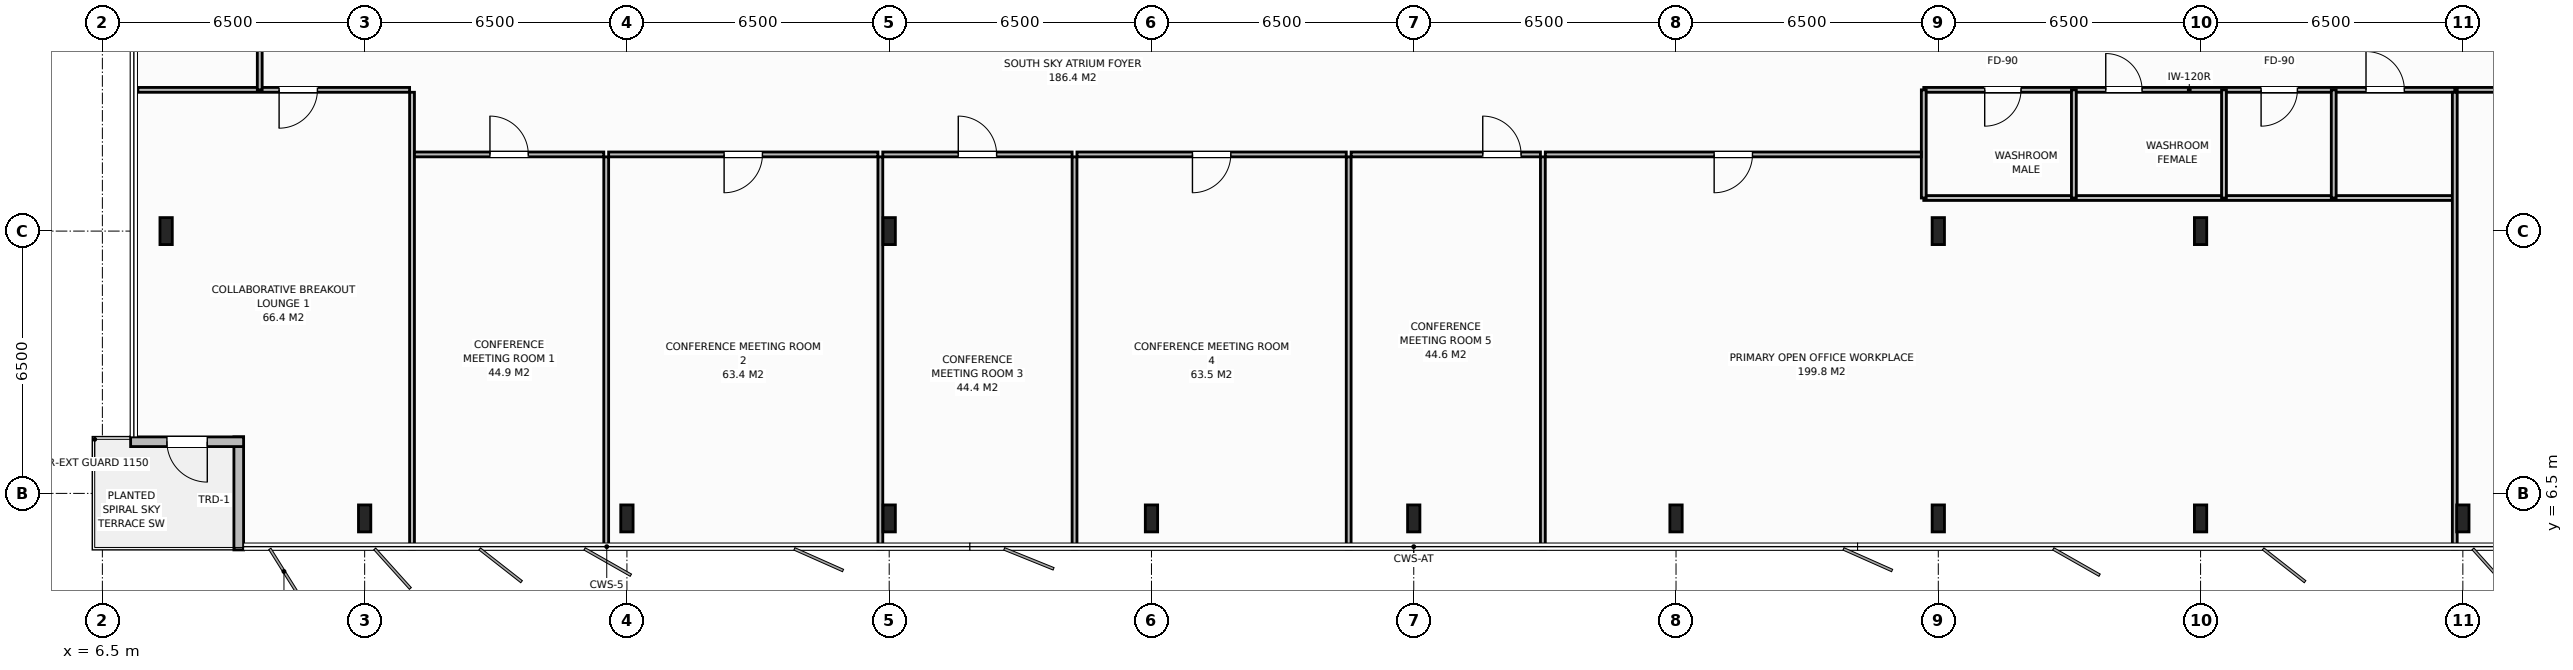
"""IFC4 building model, lengths in metres.
Left out: names, types, materials, properties, quantities, classifications, styles, units other than length and angle.
Written with IfcOpenShell. Run it as: python <this file> out.ifc"""

import sys

from ifc_helpers import new_model, si_unit, direction, frame, frame_2d, origin, origin_2d, place, context, subcontext, project, spatial, rectangle, i_section, extrude, element, fill, save


model = new_model("IFC4")
c1 = context("Model", 3, precision=1e-05, world=origin(), true_north=direction((0.0, 1.0)))
c2 = subcontext(c1, "Body", "Model", "MODEL_VIEW")
j1 = project(units=[si_unit("LENGTHUNIT", "METRE"), si_unit("PLANEANGLEUNIT", "RADIAN")], contexts=[c1])
p1 = place(None, origin())
s1 = spatial("IfcSite", under=j1, at=p1, CompositionType="ELEMENT")
p2 = place(p1, origin())
s2 = spatial("IfcBuilding", under=s1, at=p2, CompositionType="ELEMENT")
p3 = place(p2, frame((0.0, 0.0, 298.4)))
s3 = spatial("IfcBuildingStorey", under=s2, at=p3, CompositionType="ELEMENT", Elevation=298.4)
for number, where, z_axis, x_axis in (
    (1, (58.5, 13.0, 0.0), (0.0, 0.0, 1.0), (1.0, 0.0, 0.0)),
    (2, (26.0, 13.0, 0.0), (0.0, 0.0, 1.0), (1.0, 0.0, 0.0)),
    (3, (52.0, 13.0, 0.0), (0.0, 0.0, 1.0), (1.0, 0.0, 0.0)),
    (4, (13.0, 5.88, 0.0), (0.0, 0.0, 1.0), (1.0, 0.0, 0.0)),
    (5, (19.5, 5.88, 0.0), (0.0, 0.0, 1.0), (1.0, 0.0, 0.0)),
    (6, (26.0, 5.88, 0.0), (0.0, 0.0, 1.0), (1.0, 0.0, 0.0)),
    (7, (32.5, 5.88, 0.0), (0.0, 0.0, 1.0), (1.0, 0.0, 0.0)),
    (8, (39.0, 5.88, 0.0), (0.0, 0.0, 1.0), (1.0, 0.0, 0.0)),
    (9, (45.5, 5.88, 0.0), (0.0, 0.0, 1.0), (1.0, 0.0, 0.0)),
    (10, (52.0, 5.88, 0.0), (0.0, 0.0, 1.0), (1.0, 0.0, 0.0)),
    (11, (58.5, 5.88, 0.0), (0.0, 0.0, 1.0), (1.0, 0.0, 0.0)),
    (12, (65.0, 5.88, 0.0), (0.0, 0.0, 1.0), (1.0, 0.0, 0.0)),
    (13, (8.08, 13.0, 0.0), (0.0, 0.0, 1.0), (1.0, 0.0, 0.0)),
):
    element("IfcColumn", number, at=place(p3, frame(where, z_axis=z_axis, x_axis=x_axis)), inside=s3, PredefinedType="COLUMN", context=c2, shape_type="SweptSolid", body=[
        extrude(i_section(OverallWidth=0.305, OverallDepth=0.668, WebThickness=0.021, FlangeThickness=0.04, at=origin_2d()), origin(), (0.0, 0.0, 1.0), 4.0),
    ])
p4 = place(p3, frame((9.88, 5.1, 0.0), z_axis=(0.0, 0.0, 1.0), x_axis=(0.0, 1.0, 0.0)))
e14 = element("IfcWall", 14, at=p4, inside=s3, PredefinedType="STANDARD", context=c2, shape_type="SweptSolid", body=[
    extrude(rectangle(XDim=2.8, YDim=0.24, at=frame_2d((1.4, 0.0))), origin(), (0.0, 0.0, 1.0), 3.788),
])
p5 = place(p3, frame((10.0, 7.78, 0.0), z_axis=(0.0, 0.0, 1.0), x_axis=(-1.0, 0.0, 0.0)))
e15 = element("IfcWall", 15, at=p5, inside=s3, PredefinedType="STANDARD", context=c2, shape_type="SweptSolid", body=[
    extrude(rectangle(XDim=2.8, YDim=0.24, at=frame_2d((1.4, 0.0))), origin(), (0.0, 0.0, 1.0), 3.788),
])
p6 = place(p5, frame((0.9, 0.0, 0.0)))
e16 = element("IfcOpeningElement", 16, at=p6, cuts=e15, PredefinedType="OPENING", context=c2, shape_type="SweptSolid", body=[
    extrude(rectangle(XDim=1.0, YDim=2.2, at=frame_2d((0.5, 1.1))), frame((0.0, 0.13, 0.0), z_axis=(0.0, -1.0, 0.0), x_axis=(1.0, 0.0, 0.0)), (0.0, 0.0, 1.0), 0.26),
])
p7 = place(p3, frame((51.64, 16.5, 0.0), z_axis=(0.0, 0.0, 1.0), x_axis=(1.0, 0.0, 0.0)))
e17 = element("IfcWall", 17, at=p7, inside=s3, PredefinedType="PARTITIONING", context=c2, shape_type="SweptSolid", body=[
    extrude(rectangle(XDim=13.16, YDim=0.12, at=frame_2d((6.58, 0.0))), origin(), (0.0, 0.0, 1.0), 3.788),
])
p8 = place(p7, frame((1.51, 0.0, 0.0)))
e18 = element("IfcOpeningElement", 18, at=p8, cuts=e17, PredefinedType="OPENING", context=c2, shape_type="SweptSolid", body=[
    extrude(rectangle(XDim=0.9, YDim=2.15, at=frame_2d((0.45, 1.075))), frame((0.0, 0.07, 0.0), z_axis=(0.0, -1.0, 0.0), x_axis=(1.0, 0.0, 0.0)), (0.0, 0.0, 1.0), 0.14),
])
p9 = place(p7, frame((4.51, 0.0, 0.0)))
e19 = element("IfcOpeningElement", 19, at=p9, cuts=e17, PredefinedType="OPENING", context=c2, shape_type="SweptSolid", body=[
    extrude(rectangle(XDim=0.9, YDim=2.15, at=frame_2d((0.45, 1.075))), frame((0.0, 0.07, 0.0), z_axis=(0.0, -1.0, 0.0), x_axis=(1.0, 0.0, 0.0)), (0.0, 0.0, 1.0), 0.14),
])
p10 = place(p7, frame((8.36, 0.0, 0.0)))
e20 = element("IfcOpeningElement", 20, at=p10, cuts=e17, PredefinedType="OPENING", context=c2, shape_type="SweptSolid", body=[
    extrude(rectangle(XDim=0.9, YDim=2.15, at=frame_2d((0.45, 1.075))), frame((0.0, 0.07, 0.0), z_axis=(0.0, -1.0, 0.0), x_axis=(1.0, 0.0, 0.0)), (0.0, 0.0, 1.0), 0.14),
])
p11 = place(p7, frame((10.96, 0.0, 0.0)))
e21 = element("IfcOpeningElement", 21, at=p11, cuts=e17, PredefinedType="OPENING", context=c2, shape_type="SweptSolid", body=[
    extrude(rectangle(XDim=0.95, YDim=2.15, at=frame_2d((0.475, 1.075))), frame((0.0, 0.07, 0.0), z_axis=(0.0, -1.0, 0.0), x_axis=(1.0, 0.0, 0.0)), (0.0, 0.0, 1.0), 0.14),
])
p12 = place(p3, frame((51.64, 13.82, 0.0), z_axis=(0.0, 0.0, 1.0), x_axis=(1.0, 0.0, 0.0)))
e22 = element("IfcWall", 22, at=p12, inside=s3, PredefinedType="PARTITIONING", context=c2, shape_type="SweptSolid", body=[
    extrude(rectangle(XDim=13.16, YDim=0.12, at=frame_2d((6.58, 0.0))), origin(), (0.0, 0.0, 1.0), 3.788),
])
for number, where, z_axis, x_axis in (
    (23, (51.64, 13.82, 0.0), (0.0, 0.0, 1.0), (0.0, 1.0, 0.0)),
    (24, (55.36, 13.82, 0.0), (0.0, 0.0, 1.0), (0.0, 1.0, 0.0)),
    (25, (59.08, 13.82, 0.0), (0.0, 0.0, 1.0), (0.0, 1.0, 0.0)),
    (26, (61.8, 13.82, 0.0), (0.0, 0.0, 1.0), (0.0, 1.0, 0.0)),
):
    element("IfcWall", number, at=place(p3, frame(where, z_axis=z_axis, x_axis=x_axis)), inside=s3, PredefinedType="PARTITIONING", context=c2, shape_type="SweptSolid", body=[
        extrude(rectangle(XDim=2.68, YDim=0.12, at=frame_2d((1.34, 0.0))), origin(), (0.0, 0.0, 1.0), 3.788),
    ])
p13 = place(p3, frame((14.174, 5.12, 0.0), z_axis=(0.0, 0.0, 1.0), x_axis=(0.0, 1.0, 0.0)))
e27 = element("IfcWall", 27, at=p13, inside=s3, PredefinedType="PARTITIONING", context=c2, shape_type="SweptSolid", body=[
    extrude(rectangle(XDim=11.32, YDim=0.12, at=frame_2d((5.66, 0.0))), origin(), (0.0, 0.0, 1.0), 3.788),
])
p14 = place(p3, frame((7.38, 16.5, 0.0), z_axis=(0.0, 0.0, 1.0), x_axis=(1.0, 0.0, 0.0)))
e28 = element("IfcWall", 28, at=p14, inside=s3, PredefinedType="PARTITIONING", context=c2, shape_type="SweptSolid", body=[
    extrude(rectangle(XDim=6.734, YDim=0.12, at=frame_2d((3.367, 0.0))), origin(), (0.0, 0.0, 1.0), 3.788),
])
p15 = place(p14, frame((3.5, 0.0, 0.0)))
e29 = element("IfcOpeningElement", 29, at=p15, cuts=e28, PredefinedType="OPENING", context=c2, shape_type="SweptSolid", body=[
    extrude(rectangle(XDim=0.95, YDim=2.15, at=frame_2d((0.475, 1.075))), frame((0.0, 0.07, 0.0), z_axis=(0.0, -1.0, 0.0), x_axis=(1.0, 0.0, 0.0)), (0.0, 0.0, 1.0), 0.14),
])
p16 = place(p3, frame((18.987, 5.12, 0.0), z_axis=(0.0, 0.0, 1.0), x_axis=(0.0, 1.0, 0.0)))
e30 = element("IfcWall", 30, at=p16, inside=s3, PredefinedType="PARTITIONING", context=c2, shape_type="SweptSolid", body=[
    extrude(rectangle(XDim=9.72, YDim=0.12, at=frame_2d((4.86, 0.0))), origin(), (0.0, 0.0, 1.0), 3.788),
])
p17 = place(p3, frame((14.234, 14.9, 0.0), z_axis=(0.0, 0.0, 1.0), x_axis=(1.0, 0.0, 0.0)))
e31 = element("IfcWall", 31, at=p17, inside=s3, PredefinedType="PARTITIONING", context=c2, shape_type="SweptSolid", body=[
    extrude(rectangle(XDim=4.693, YDim=0.12, at=frame_2d((2.346, 0.0))), origin(), (0.0, 0.0, 1.0), 3.788),
])
p18 = place(p17, frame((1.871, 0.0, 0.0)))
e32 = element("IfcOpeningElement", 32, at=p18, cuts=e31, PredefinedType="OPENING", context=c2, shape_type="SweptSolid", body=[
    extrude(rectangle(XDim=0.95, YDim=2.15, at=frame_2d((0.475, 1.075))), frame((0.0, 0.07, 0.0), z_axis=(0.0, -1.0, 0.0), x_axis=(1.0, 0.0, 0.0)), (0.0, 0.0, 1.0), 0.14),
])
p19 = place(p3, frame((25.781, 5.12, 0.0), z_axis=(0.0, 0.0, 1.0), x_axis=(0.0, 1.0, 0.0)))
e33 = element("IfcWall", 33, at=p19, inside=s3, PredefinedType="PARTITIONING", context=c2, shape_type="SweptSolid", body=[
    extrude(rectangle(XDim=9.72, YDim=0.12, at=frame_2d((4.86, 0.0))), origin(), (0.0, 0.0, 1.0), 2.988),
])
p20 = place(p3, frame((19.047, 14.9, 0.0), z_axis=(0.0, 0.0, 1.0), x_axis=(1.0, 0.0, 0.0)))
e34 = element("IfcWall", 34, at=p20, inside=s3, PredefinedType="PARTITIONING", context=c2, shape_type="SweptSolid", body=[
    extrude(rectangle(XDim=6.674, YDim=0.12, at=frame_2d((3.337, 0.0))), origin(), (0.0, 0.0, 1.0), 3.788),
])
p21 = place(p20, frame((2.862, 0.0, 0.0)))
e35 = element("IfcOpeningElement", 35, at=p21, cuts=e34, PredefinedType="OPENING", context=c2, shape_type="SweptSolid", body=[
    extrude(rectangle(XDim=0.95, YDim=2.15, at=frame_2d((0.475, 1.075))), frame((0.0, 0.07, 0.0), z_axis=(0.0, -1.0, 0.0), x_axis=(1.0, 0.0, 0.0)), (0.0, 0.0, 1.0), 0.14),
])
p22 = place(p3, frame((30.593, 5.12, 0.0), z_axis=(0.0, 0.0, 1.0), x_axis=(0.0, 1.0, 0.0)))
e36 = element("IfcWall", 36, at=p22, inside=s3, PredefinedType="PARTITIONING", context=c2, shape_type="SweptSolid", body=[
    extrude(rectangle(XDim=9.72, YDim=0.12, at=frame_2d((4.86, 0.0))), origin(), (0.0, 0.0, 1.0), 3.788),
])
p23 = place(p3, frame((25.841, 14.9, 0.0), z_axis=(0.0, 0.0, 1.0), x_axis=(1.0, 0.0, 0.0)))
e37 = element("IfcWall", 37, at=p23, inside=s3, PredefinedType="PARTITIONING", context=c2, shape_type="SweptSolid", body=[
    extrude(rectangle(XDim=4.692, YDim=0.12, at=frame_2d((2.346, 0.0))), origin(), (0.0, 0.0, 1.0), 3.788),
])
p24 = place(p23, frame((1.871, 0.0, 0.0)))
e38 = element("IfcOpeningElement", 38, at=p24, cuts=e37, PredefinedType="OPENING", context=c2, shape_type="SweptSolid", body=[
    extrude(rectangle(XDim=0.95, YDim=2.15, at=frame_2d((0.475, 1.075))), frame((0.0, 0.07, 0.0), z_axis=(0.0, -1.0, 0.0), x_axis=(1.0, 0.0, 0.0)), (0.0, 0.0, 1.0), 0.14),
])
p25 = place(p3, frame((37.387, 5.12, 0.0), z_axis=(0.0, 0.0, 1.0), x_axis=(0.0, 1.0, 0.0)))
e39 = element("IfcWall", 39, at=p25, inside=s3, PredefinedType="PARTITIONING", context=c2, shape_type="SweptSolid", body=[
    extrude(rectangle(XDim=9.72, YDim=0.12, at=frame_2d((4.86, 0.0))), origin(), (0.0, 0.0, 1.0), 3.788),
])
p26 = place(p3, frame((30.653, 14.9, 0.0), z_axis=(0.0, 0.0, 1.0), x_axis=(1.0, 0.0, 0.0)))
e40 = element("IfcWall", 40, at=p26, inside=s3, PredefinedType="PARTITIONING", context=c2, shape_type="SweptSolid", body=[
    extrude(rectangle(XDim=6.674, YDim=0.12, at=frame_2d((3.337, 0.0))), origin(), (0.0, 0.0, 1.0), 3.788),
])
p27 = place(p26, frame((2.862, 0.0, 0.0)))
e41 = element("IfcOpeningElement", 41, at=p27, cuts=e40, PredefinedType="OPENING", context=c2, shape_type="SweptSolid", body=[
    extrude(rectangle(XDim=0.95, YDim=2.15, at=frame_2d((0.475, 1.075))), frame((0.0, 0.07, 0.0), z_axis=(0.0, -1.0, 0.0), x_axis=(1.0, 0.0, 0.0)), (0.0, 0.0, 1.0), 0.14),
])
p28 = place(p3, frame((42.2, 5.12, 0.0), z_axis=(0.0, 0.0, 1.0), x_axis=(0.0, 1.0, 0.0)))
e42 = element("IfcWall", 42, at=p28, inside=s3, PredefinedType="PARTITIONING", context=c2, shape_type="SweptSolid", body=[
    extrude(rectangle(XDim=9.72, YDim=0.12, at=frame_2d((4.86, 0.0))), origin(), (0.0, 0.0, 1.0), 3.788),
])
p29 = place(p3, frame((37.448, 14.9, 0.0), z_axis=(0.0, 0.0, 1.0), x_axis=(1.0, 0.0, 0.0)))
e43 = element("IfcWall", 43, at=p29, inside=s3, PredefinedType="PARTITIONING", context=c2, shape_type="SweptSolid", body=[
    extrude(rectangle(XDim=4.692, YDim=0.12, at=frame_2d((2.346, 0.0))), origin(), (0.0, 0.0, 1.0), 3.788),
])
p30 = place(p29, frame((3.262, 0.0, 0.0)))
e44 = element("IfcOpeningElement", 44, at=p30, cuts=e43, PredefinedType="OPENING", context=c2, shape_type="SweptSolid", body=[
    extrude(rectangle(XDim=0.95, YDim=2.15, at=frame_2d((0.475, 1.075))), frame((0.0, 0.07, 0.0), z_axis=(0.0, -1.0, 0.0), x_axis=(1.0, 0.0, 0.0)), (0.0, 0.0, 1.0), 0.14),
])
p31 = place(p3, frame((64.8, 5.12, 0.0), z_axis=(0.0, 0.0, 1.0), x_axis=(0.0, 1.0, 0.0)))
e45 = element("IfcWall", 45, at=p31, inside=s3, PredefinedType="PARTITIONING", context=c2, shape_type="SweptSolid", body=[
    extrude(rectangle(XDim=11.32, YDim=0.12, at=frame_2d((5.66, 0.0))), origin(), (0.0, 0.0, 1.0), 2.988),
])
p32 = place(p3, frame((42.26, 14.9, 0.0), z_axis=(0.0, 0.0, 1.0), x_axis=(1.0, 0.0, 0.0)))
e46 = element("IfcWall", 46, at=p32, inside=s3, PredefinedType="PARTITIONING", context=c2, shape_type="SweptSolid", body=[
    extrude(rectangle(XDim=9.32, YDim=0.12, at=frame_2d((4.66, 0.0))), origin(), (0.0, 0.0, 1.0), 3.788),
])
p33 = place(p32, frame((4.185, 0.0, 0.0)))
e47 = element("IfcOpeningElement", 47, at=p33, cuts=e46, PredefinedType="OPENING", context=c2, shape_type="SweptSolid", body=[
    extrude(rectangle(XDim=0.95, YDim=2.15, at=frame_2d((0.475, 1.075))), frame((0.0, 0.07, 0.0), z_axis=(0.0, -1.0, 0.0), x_axis=(1.0, 0.0, 0.0)), (0.0, 0.0, 1.0), 0.14),
])
p34 = place(p3, frame((64.86, 16.5, 0.0), z_axis=(0.0, 0.0, 1.0), x_axis=(1.0, 0.0, 0.0)))
e48 = element("IfcWall", 48, at=p34, inside=s3, PredefinedType="PARTITIONING", context=c2, shape_type="SweptSolid", body=[
    extrude(rectangle(XDim=8.871, YDim=0.12, at=frame_2d((4.436, 0.0))), origin(), (0.0, 0.0, 1.0), 3.788),
])
p35 = place(p34, frame((1.31, 0.0, 0.0)))
e49 = element("IfcOpeningElement", 49, at=p35, cuts=e48, PredefinedType="OPENING", context=c2, shape_type="SweptSolid", body=[
    extrude(rectangle(XDim=0.95, YDim=2.15, at=frame_2d((0.475, 1.075))), frame((0.0, 0.07, 0.0), z_axis=(0.0, -1.0, 0.0), x_axis=(1.0, 0.0, 0.0)), (0.0, 0.0, 1.0), 0.14),
])
p36 = place(p3, frame((10.4, 16.5, 0.0), z_axis=(0.0, 0.0, 1.0), x_axis=(0.0, 1.0, 0.0)))
e50 = element("IfcWall", 50, at=p36, inside=s3, PredefinedType="PARTITIONING", context=c2, shape_type="SweptSolid", body=[
    extrude(rectangle(XDim=6.333, YDim=0.12, at=frame_2d((3.167, 0.0))), origin(), (0.0, 0.0, 1.0), 3.788),
])
p37 = place(p36, frame((3.742, 0.0, 0.0)))
e51 = element("IfcOpeningElement", 51, at=p37, cuts=e50, PredefinedType="OPENING", context=c2, shape_type="SweptSolid", body=[
    extrude(rectangle(XDim=0.95, YDim=2.15, at=frame_2d((0.475, 1.075))), frame((0.0, 0.07, 0.0), z_axis=(0.0, -1.0, 0.0), x_axis=(1.0, 0.0, 0.0)), (0.0, 0.0, 1.0), 0.14),
])
p38 = place(p6, origin())
e52 = element("IfcDoor", 52, at=p38, inside=s3, OperationType="SINGLE_SWING_LEFT", PredefinedType="DOOR", context=c2, shape_type="SweptSolid", body=[
    extrude(rectangle(XDim=1.0, YDim=2.2, at=frame_2d((0.5, 1.1))), frame((0.0, 0.025, 0.0), z_axis=(0.0, -1.0, 0.0), x_axis=(1.0, 0.0, 0.0)), (0.0, 0.0, 1.0), 0.05),
])
fill(e16, e52)
p39 = place(p8, origin())
e53 = element("IfcDoor", 53, at=p39, inside=s3, OperationType="SINGLE_SWING_RIGHT", PredefinedType="DOOR", context=c2, shape_type="SweptSolid", body=[
    extrude(rectangle(XDim=0.9, YDim=2.15, at=frame_2d((0.45, 1.075))), frame((0.0, 0.025, 0.0), z_axis=(0.0, -1.0, 0.0), x_axis=(1.0, 0.0, 0.0)), (0.0, 0.0, 1.0), 0.05),
])
fill(e18, e53)
p40 = place(p9, origin())
e54 = element("IfcDoor", 54, at=p40, inside=s3, OperationType="SINGLE_SWING_LEFT", PredefinedType="DOOR", context=c2, shape_type="SweptSolid", body=[
    extrude(rectangle(XDim=0.9, YDim=2.15, at=frame_2d((0.45, 1.075))), frame((0.0, 0.025, 0.0), z_axis=(0.0, -1.0, 0.0), x_axis=(1.0, 0.0, 0.0)), (0.0, 0.0, 1.0), 0.05),
])
fill(e19, e54)
p41 = place(p10, origin())
e55 = element("IfcDoor", 55, at=p41, inside=s3, OperationType="SINGLE_SWING_RIGHT", PredefinedType="DOOR", context=c2, shape_type="SweptSolid", body=[
    extrude(rectangle(XDim=0.9, YDim=2.15, at=frame_2d((0.45, 1.075))), frame((0.0, 0.025, 0.0), z_axis=(0.0, -1.0, 0.0), x_axis=(1.0, 0.0, 0.0)), (0.0, 0.0, 1.0), 0.05),
])
fill(e20, e55)
p42 = place(p11, origin())
e56 = element("IfcDoor", 56, at=p42, inside=s3, OperationType="SINGLE_SWING_LEFT", PredefinedType="DOOR", context=c2, shape_type="SweptSolid", body=[
    extrude(rectangle(XDim=0.95, YDim=2.15, at=frame_2d((0.475, 1.075))), frame((0.0, 0.025, 0.0), z_axis=(0.0, -1.0, 0.0), x_axis=(1.0, 0.0, 0.0)), (0.0, 0.0, 1.0), 0.05),
])
fill(e21, e56)
p43 = place(p15, origin())
e57 = element("IfcDoor", 57, at=p43, inside=s3, OperationType="SINGLE_SWING_RIGHT", PredefinedType="DOOR", context=c2, shape_type="SweptSolid", body=[
    extrude(rectangle(XDim=0.95, YDim=2.15, at=frame_2d((0.475, 1.075))), frame((0.0, 0.025, 0.0), z_axis=(0.0, -1.0, 0.0), x_axis=(1.0, 0.0, 0.0)), (0.0, 0.0, 1.0), 0.05),
])
fill(e29, e57)
p44 = place(p18, origin())
e58 = element("IfcDoor", 58, at=p44, inside=s3, OperationType="SINGLE_SWING_LEFT", PredefinedType="DOOR", context=c2, shape_type="SweptSolid", body=[
    extrude(rectangle(XDim=0.95, YDim=2.15, at=frame_2d((0.475, 1.075))), frame((0.0, 0.025, 0.0), z_axis=(0.0, -1.0, 0.0), x_axis=(1.0, 0.0, 0.0)), (0.0, 0.0, 1.0), 0.05),
])
fill(e32, e58)
p45 = place(p21, origin())
e59 = element("IfcDoor", 59, at=p45, inside=s3, OperationType="SINGLE_SWING_RIGHT", PredefinedType="DOOR", context=c2, shape_type="SweptSolid", body=[
    extrude(rectangle(XDim=0.95, YDim=2.15, at=frame_2d((0.475, 1.075))), frame((0.0, 0.025, 0.0), z_axis=(0.0, -1.0, 0.0), x_axis=(1.0, 0.0, 0.0)), (0.0, 0.0, 1.0), 0.05),
])
fill(e35, e59)
p46 = place(p24, origin())
e60 = element("IfcDoor", 60, at=p46, inside=s3, OperationType="SINGLE_SWING_LEFT", PredefinedType="DOOR", context=c2, shape_type="SweptSolid", body=[
    extrude(rectangle(XDim=0.95, YDim=2.15, at=frame_2d((0.475, 1.075))), frame((0.0, 0.025, 0.0), z_axis=(0.0, -1.0, 0.0), x_axis=(1.0, 0.0, 0.0)), (0.0, 0.0, 1.0), 0.05),
])
fill(e38, e60)
p47 = place(p27, origin())
e61 = element("IfcDoor", 61, at=p47, inside=s3, OperationType="SINGLE_SWING_RIGHT", PredefinedType="DOOR", context=c2, shape_type="SweptSolid", body=[
    extrude(rectangle(XDim=0.95, YDim=2.15, at=frame_2d((0.475, 1.075))), frame((0.0, 0.025, 0.0), z_axis=(0.0, -1.0, 0.0), x_axis=(1.0, 0.0, 0.0)), (0.0, 0.0, 1.0), 0.05),
])
fill(e41, e61)
p48 = place(p30, origin())
e62 = element("IfcDoor", 62, at=p48, inside=s3, OperationType="SINGLE_SWING_LEFT", PredefinedType="DOOR", context=c2, shape_type="SweptSolid", body=[
    extrude(rectangle(XDim=0.95, YDim=2.15, at=frame_2d((0.475, 1.075))), frame((0.0, 0.025, 0.0), z_axis=(0.0, -1.0, 0.0), x_axis=(1.0, 0.0, 0.0)), (0.0, 0.0, 1.0), 0.05),
])
fill(e44, e62)
p49 = place(p33, origin())
e63 = element("IfcDoor", 63, at=p49, inside=s3, OperationType="SINGLE_SWING_RIGHT", PredefinedType="DOOR", context=c2, shape_type="SweptSolid", body=[
    extrude(rectangle(XDim=0.95, YDim=2.15, at=frame_2d((0.475, 1.075))), frame((0.0, 0.025, 0.0), z_axis=(0.0, -1.0, 0.0), x_axis=(1.0, 0.0, 0.0)), (0.0, 0.0, 1.0), 0.05),
])
fill(e47, e63)
save(model, sys.argv[1])
